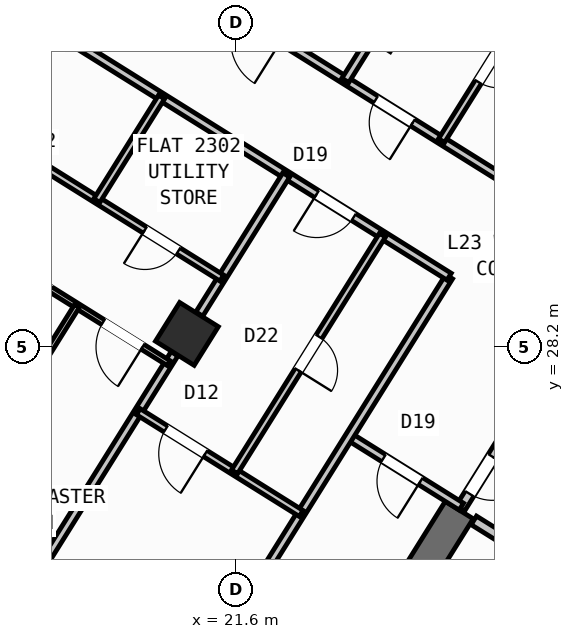
"""IFC4 building model, lengths in metres.
Left out: names, types, materials, properties, quantities, classifications, styles, units other than length and angle.
Written with IfcOpenShell. Run it as: python <this file> out.ifc"""

import sys

from ifc_helpers import new_model, si_unit, direction, frame, frame_2d, origin, origin_2d, place, context, subcontext, project, spatial, rectangle, hollow_rectangle, extrude, source, transform, mapped, element, fill, save


model = new_model("IFC4")
c1 = context("Model", 3, precision=1e-05, world=origin(), true_north=direction((0.0, 1.0)))
c2 = subcontext(c1, "Body", "Model", "MODEL_VIEW")
j1 = project(units=[si_unit("LENGTHUNIT", "METRE"), si_unit("PLANEANGLEUNIT", "RADIAN")], contexts=[c1])
p1 = place(None, origin())
s1 = spatial("IfcSite", under=j1, at=p1, CompositionType="ELEMENT")
p2 = place(p1, origin())
s2 = spatial("IfcBuilding", under=s1, at=p2, CompositionType="ELEMENT")
p3 = place(p2, frame((0.0, 0.0, 93.6)))
s3 = spatial("IfcBuildingStorey", under=s2, at=p3, CompositionType="ELEMENT", Elevation=93.6)
p4 = place(p3, frame((26.007, 24.976, 0.0), z_axis=(0.0, 0.0, 1.0), x_axis=(-0.529916319127, -0.848049936456, 0.0)))
e1 = element("IfcWall", 1, at=p4, inside=s3, PredefinedType="SHEAR", context=c2, shape_type="SweptSolid", body=[
    extrude(rectangle(XDim=6.375, YDim=0.65, at=frame_2d((3.188, 0.0))), origin(), (0.0, 0.0, 1.0), 3.35),
])
m1 = source(origin(), c2, "Body", "SweptSolid", [
    extrude(hollow_rectangle(XDim=0.9, YDim=0.9, WallThickness=0.036, at=origin_2d()), origin(), (0.0, 0.0, 1.0), 3.6),
])
p5 = place(p3, frame((20.632, 28.452, 0.0), z_axis=(0.0, 0.0, 1.0), x_axis=(-0.848048096156, 0.529919264233, 0.0)))
e2 = element("IfcColumn", 2, at=p5, inside=s3, PredefinedType="COLUMN", context=c2, shape_type="MappedRepresentation", body=[
    mapped(m1, transform((0.0, 0.0, 0.0), scale=1.0)),
])
p6 = place(p3, frame((31.76, 12.183, 0.0), z_axis=(0.0, 0.0, 1.0), x_axis=(-0.848047074256, 0.529920899612, 0.0)))
e3 = element("IfcWall", 3, at=p6, inside=s3, PredefinedType="STANDARD", context=c2, shape_type="SweptSolid", body=[
    extrude(rectangle(XDim=30.652, YDim=0.32, at=frame_2d((15.326, 0.0))), origin(), (0.0, 0.0, 1.0), 3.35),
])
p7 = place(p6, frame((15.153, 0.0, 0.0)))
e4 = element("IfcOpeningElement", 4, at=p7, cuts=e3, PredefinedType="OPENING", context=c2, shape_type="SweptSolid", body=[
    extrude(rectangle(XDim=1.2, YDim=2.15, at=frame_2d((0.6, 1.075))), frame((0.0, 0.17, 0.0), z_axis=(0.0, -1.0, 0.0), x_axis=(1.0, 0.0, 0.0)), (0.0, 0.0, 1.0), 0.34),
])
p8 = place(p6, frame((2.002, 0.0, 0.8)))
e5 = element("IfcOpeningElement", 5, at=p8, cuts=e3, PredefinedType="OPENING", context=c2, shape_type="SweptSolid", body=[
    extrude(rectangle(XDim=2.1, YDim=1.55, at=frame_2d((1.05, 0.775))), frame((0.0, 0.17, 0.0), z_axis=(0.0, -1.0, 0.0), x_axis=(1.0, 0.0, 0.0)), (0.0, 0.0, 1.0), 0.34),
])
p9 = place(p6, frame((7.206, 0.0, 0.8)))
e6 = element("IfcOpeningElement", 6, at=p9, cuts=e3, PredefinedType="OPENING", context=c2, shape_type="SweptSolid", body=[
    extrude(rectangle(XDim=2.1, YDim=1.55, at=frame_2d((1.05, 0.775))), frame((0.0, 0.17, 0.0), z_axis=(0.0, -1.0, 0.0), x_axis=(1.0, 0.0, 0.0)), (0.0, 0.0, 1.0), 0.34),
])
p10 = place(p6, frame((12.648, 0.0, 1.0)))
e7 = element("IfcOpeningElement", 7, at=p10, cuts=e3, PredefinedType="OPENING", context=c2, shape_type="SweptSolid", body=[
    extrude(rectangle(XDim=0.9, YDim=1.25, at=frame_2d((0.45, 0.625))), frame((0.0, 0.17, 0.0), z_axis=(0.0, -1.0, 0.0), x_axis=(1.0, 0.0, 0.0)), (0.0, 0.0, 1.0), 0.34),
])
p11 = place(p6, frame((27.974, 0.0, 0.95)))
e8 = element("IfcOpeningElement", 8, at=p11, cuts=e3, PredefinedType="OPENING", context=c2, shape_type="SweptSolid", body=[
    extrude(rectangle(XDim=1.2, YDim=1.4, at=frame_2d((0.6, 0.7))), frame((0.0, 0.17, 0.0), z_axis=(0.0, -1.0, 0.0), x_axis=(1.0, 0.0, 0.0)), (0.0, 0.0, 1.0), 0.34),
])
p12 = place(p6, frame((18.347, 0.0, 1.0)))
e9 = element("IfcOpeningElement", 9, at=p12, cuts=e3, PredefinedType="OPENING", context=c2, shape_type="SweptSolid", body=[
    extrude(rectangle(XDim=0.9, YDim=1.25, at=frame_2d((0.45, 0.625))), frame((0.0, 0.17, 0.0), z_axis=(0.0, -1.0, 0.0), x_axis=(1.0, 0.0, 0.0)), (0.0, 0.0, 1.0), 0.34),
])
p13 = place(p6, frame((20.931, 0.0, 1.0)))
e10 = element("IfcOpeningElement", 10, at=p13, cuts=e3, PredefinedType="OPENING", context=c2, shape_type="SweptSolid", body=[
    extrude(rectangle(XDim=0.65, YDim=1.15, at=frame_2d((0.325, 0.575))), frame((0.0, 0.17, 0.0), z_axis=(0.0, -1.0, 0.0), x_axis=(1.0, 0.0, 0.0)), (0.0, 0.0, 1.0), 0.34),
])
p14 = place(p6, frame((22.938, 0.0, 1.0)))
e11 = element("IfcOpeningElement", 11, at=p14, cuts=e3, PredefinedType="OPENING", context=c2, shape_type="SweptSolid", body=[
    extrude(rectangle(XDim=0.9, YDim=1.25, at=frame_2d((0.45, 0.625))), frame((0.0, 0.17, 0.0), z_axis=(0.0, -1.0, 0.0), x_axis=(1.0, 0.0, 0.0)), (0.0, 0.0, 1.0), 0.34),
])
p15 = place(p6, frame((25.069, 0.0, 1.0)))
e12 = element("IfcOpeningElement", 12, at=p15, cuts=e3, PredefinedType="OPENING", context=c2, shape_type="SweptSolid", body=[
    extrude(rectangle(XDim=0.9, YDim=1.25, at=frame_2d((0.45, 0.625))), frame((0.0, 0.17, 0.0), z_axis=(0.0, -1.0, 0.0), x_axis=(1.0, 0.0, 0.0)), (0.0, 0.0, 1.0), 0.34),
])
p16 = place(p3, frame((17.424, 47.083, 0.0), z_axis=(0.0, 0.0, 1.0), x_axis=(0.848049927979, -0.529916332693, 0.0)))
e13 = element("IfcWall", 13, at=p16, inside=s3, PredefinedType="STANDARD", context=c2, shape_type="SweptSolid", body=[
    extrude(rectangle(XDim=29.223, YDim=0.32, at=frame_2d((14.612, 0.0))), origin(), (0.0, 0.0, 1.0), 3.35),
])
p17 = place(p16, frame((3.745, 0.0, 0.0)))
e14 = element("IfcOpeningElement", 14, at=p17, cuts=e13, PredefinedType="OPENING", context=c2, shape_type="SweptSolid", body=[
    extrude(rectangle(XDim=1.05, YDim=2.15, at=frame_2d((0.525, 1.075))), frame((0.0, 0.17, 0.0), z_axis=(0.0, -1.0, 0.0), x_axis=(1.0, 0.0, 0.0)), (0.0, 0.0, 1.0), 0.34),
])
p18 = place(p16, frame((0.699, 0.0, 0.95)))
e15 = element("IfcOpeningElement", 15, at=p18, cuts=e13, PredefinedType="OPENING", context=c2, shape_type="SweptSolid", body=[
    extrude(rectangle(XDim=1.2, YDim=1.4, at=frame_2d((0.6, 0.7))), frame((0.0, 0.17, 0.0), z_axis=(0.0, -1.0, 0.0), x_axis=(1.0, 0.0, 0.0)), (0.0, 0.0, 1.0), 0.34),
])
p19 = place(p16, frame((6.951, 0.0, 1.0)))
e16 = element("IfcOpeningElement", 16, at=p19, cuts=e13, PredefinedType="OPENING", context=c2, shape_type="SweptSolid", body=[
    extrude(rectangle(XDim=0.9, YDim=1.25, at=frame_2d((0.45, 0.625))), frame((0.0, 0.17, 0.0), z_axis=(0.0, -1.0, 0.0), x_axis=(1.0, 0.0, 0.0)), (0.0, 0.0, 1.0), 0.34),
])
p20 = place(p16, frame((9.841, 0.0, 0.85)))
e17 = element("IfcOpeningElement", 17, at=p20, cuts=e13, PredefinedType="OPENING", context=c2, shape_type="SweptSolid", body=[
    extrude(rectangle(XDim=1.5, YDim=1.5, at=frame_2d((0.75, 0.75))), frame((0.0, 0.17, 0.0), z_axis=(0.0, -1.0, 0.0), x_axis=(1.0, 0.0, 0.0)), (0.0, 0.0, 1.0), 0.34),
])
p21 = place(p16, frame((13.889, 0.0, 0.95)))
e18 = element("IfcOpeningElement", 18, at=p21, cuts=e13, PredefinedType="OPENING", context=c2, shape_type="SweptSolid", body=[
    extrude(rectangle(XDim=1.2, YDim=1.4, at=frame_2d((0.6, 0.7))), frame((0.0, 0.17, 0.0), z_axis=(0.0, -1.0, 0.0), x_axis=(1.0, 0.0, 0.0)), (0.0, 0.0, 1.0), 0.34),
])
p22 = place(p16, frame((17.254, 0.0, 1.0)))
e19 = element("IfcOpeningElement", 19, at=p22, cuts=e13, PredefinedType="OPENING", context=c2, shape_type="SweptSolid", body=[
    extrude(rectangle(XDim=0.9, YDim=1.25, at=frame_2d((0.45, 0.625))), frame((0.0, 0.17, 0.0), z_axis=(0.0, -1.0, 0.0), x_axis=(1.0, 0.0, 0.0)), (0.0, 0.0, 1.0), 0.34),
])
p23 = place(p16, frame((20.764, 0.0, 0.8)))
e20 = element("IfcOpeningElement", 20, at=p23, cuts=e13, PredefinedType="OPENING", context=c2, shape_type="SweptSolid", body=[
    extrude(rectangle(XDim=2.1, YDim=1.55, at=frame_2d((1.05, 0.775))), frame((0.0, 0.17, 0.0), z_axis=(0.0, -1.0, 0.0), x_axis=(1.0, 0.0, 0.0)), (0.0, 0.0, 1.0), 0.34),
])
p24 = place(p16, frame((25.403, 0.0, 0.8)))
e21 = element("IfcOpeningElement", 21, at=p24, cuts=e13, PredefinedType="OPENING", context=c2, shape_type="SweptSolid", body=[
    extrude(rectangle(XDim=2.1, YDim=1.55, at=frame_2d((1.05, 0.775))), frame((0.0, 0.17, 0.0), z_axis=(0.0, -1.0, 0.0), x_axis=(1.0, 0.0, 0.0)), (0.0, 0.0, 1.0), 0.34),
])
p25 = place(p3, frame((31.525, 21.504, 0.0), z_axis=(0.0, 0.0, 1.0), x_axis=(-0.848044998614, 0.529924221305, 0.0)))
e22 = element("IfcWall", 22, at=p25, inside=s3, PredefinedType="STANDARD", context=c2, shape_type="SweptSolid", body=[
    extrude(rectangle(XDim=6.168, YDim=0.2, at=frame_2d((3.084, 0.0))), origin(), (0.0, 0.0, 1.0), 3.34),
])
p26 = place(p25, frame((4.4, 0.0, 0.0)))
e23 = element("IfcOpeningElement", 23, at=p26, cuts=e22, PredefinedType="OPENING", context=c2, shape_type="SweptSolid", body=[
    extrude(rectangle(XDim=0.86, YDim=2.05, at=frame_2d((0.43, 1.025))), frame((0.0, 0.11, 0.0), z_axis=(0.0, -1.0, 0.0), x_axis=(1.0, 0.0, 0.0)), (0.0, 0.0, 1.0), 0.22),
])
p27 = place(p25, frame((0.35, 0.0, 0.0)))
e24 = element("IfcOpeningElement", 24, at=p27, cuts=e22, PredefinedType="OPENING", context=c2, shape_type="SweptSolid", body=[
    extrude(rectangle(XDim=0.86, YDim=2.05, at=frame_2d((0.43, 1.025))), frame((0.0, 0.11, 0.0), z_axis=(0.0, -1.0, 0.0), x_axis=(1.0, 0.0, 0.0)), (0.0, 0.0, 1.0), 0.22),
])
p28 = place(p3, frame((27.596, 27.52, 0.0), z_axis=(0.0, 0.0, 1.0), x_axis=(-0.529865479138, -0.848081702443, 0.0)))
e25 = element("IfcWall", 25, at=p28, inside=s3, PredefinedType="STANDARD", context=c2, shape_type="SweptSolid", body=[
    extrude(rectangle(XDim=2.96, YDim=0.2, at=frame_2d((1.48, 0.0))), origin(), (0.0, 0.0, 1.0), 3.34),
])
p29 = place(p28, frame((1.76, 0.0, 0.0)))
e26 = element("IfcOpeningElement", 26, at=p29, cuts=e25, PredefinedType="OPENING", context=c2, shape_type="SweptSolid", body=[
    extrude(rectangle(XDim=0.86, YDim=2.05, at=frame_2d((0.43, 1.025))), frame((0.0, 0.11, 0.0), z_axis=(0.0, -1.0, 0.0), x_axis=(1.0, 0.0, 0.0)), (0.0, 0.0, 1.0), 0.22),
])
p30 = place(p3, frame((26.049, 25.044, 0.0), z_axis=(0.0, 0.0, 1.0), x_axis=(-0.848050851465, 0.529914854792, 0.0)))
e27 = element("IfcWall", 27, at=p30, inside=s3, PredefinedType="PARTITIONING", context=c2, shape_type="SweptSolid", body=[
    extrude(rectangle(XDim=2.61, YDim=0.16, at=frame_2d((1.305, 0.0))), origin(), (0.0, 0.0, 1.0), 2.775),
])
p31 = place(p30, frame((0.95, 0.0, 0.0)))
e28 = element("IfcOpeningElement", 28, at=p31, cuts=e27, PredefinedType="OPENING", context=c2, shape_type="SweptSolid", body=[
    extrude(rectangle(XDim=0.86, YDim=2.05, at=frame_2d((0.43, 1.025))), frame((0.0, 0.09, 0.0), z_axis=(0.0, -1.0, 0.0), x_axis=(1.0, 0.0, 0.0)), (0.0, 0.0, 1.0), 0.18),
])
p32 = place(p3, frame((25.807, 29.582, 0.0), z_axis=(0.0, 0.0, 1.0), x_axis=(-0.529920357077, -0.848047413271, 0.0)))
e29 = element("IfcWall", 29, at=p32, inside=s3, PredefinedType="PARTITIONING", context=c2, shape_type="SweptSolid", body=[
    extrude(rectangle(XDim=11.45, YDim=0.16, at=frame_2d((5.725, 0.0))), origin(), (0.0, 0.0, 1.0), 3.34),
])
p33 = place(p3, frame((26.973, 31.447, 0.0), z_axis=(0.0, 0.0, 1.0), x_axis=(-0.848048310262, 0.529918921593, 0.0)))
e30 = element("IfcWall", 30, at=p33, inside=s3, PredefinedType="PARTITIONING", context=c2, shape_type="SweptSolid", body=[
    extrude(rectangle(XDim=16.73, YDim=0.16, at=frame_2d((8.365, 0.0))), origin(), (0.0, 0.0, 1.0), 3.34),
])
p34 = place(p33, frame((2.22, 0.0, 0.0)))
e31 = element("IfcOpeningElement", 31, at=p34, cuts=e30, PredefinedType="OPENING", context=c2, shape_type="SweptSolid", body=[
    extrude(rectangle(XDim=0.86, YDim=2.05, at=frame_2d((0.43, 1.025))), frame((0.0, 0.09, 0.0), z_axis=(0.0, -1.0, 0.0), x_axis=(1.0, 0.0, 0.0)), (0.0, 0.0, 1.0), 0.18),
])
p35 = place(p33, frame((5.28, 0.0, 0.0)))
e32 = element("IfcOpeningElement", 32, at=p35, cuts=e30, PredefinedType="OPENING", context=c2, shape_type="SweptSolid", body=[
    extrude(rectangle(XDim=1.0, YDim=2.1, at=frame_2d((0.5, 1.05))), frame((0.0, 0.09, 0.0), z_axis=(0.0, -1.0, 0.0), x_axis=(1.0, 0.0, 0.0)), (0.0, 0.0, 1.0), 0.18),
])
p36 = place(p3, frame((25.807, 29.582, 0.0), z_axis=(0.0, 0.0, 1.0), x_axis=(-0.848052408131, 0.529912363569, 0.0)))
e33 = element("IfcWall", 33, at=p36, inside=s3, PredefinedType="PARTITIONING", context=c2, shape_type="SweptSolid", body=[
    extrude(rectangle(XDim=16.73, YDim=0.16, at=frame_2d((8.365, 0.0))), origin(), (0.0, 0.0, 1.0), 3.34),
])
p37 = place(p36, frame((2.22, 0.0, 0.0)))
e34 = element("IfcOpeningElement", 34, at=p37, cuts=e33, PredefinedType="OPENING", context=c2, shape_type="SweptSolid", body=[
    extrude(rectangle(XDim=0.86, YDim=2.05, at=frame_2d((0.43, 1.025))), frame((0.0, 0.09, 0.0), z_axis=(0.0, -1.0, 0.0), x_axis=(1.0, 0.0, 0.0)), (0.0, 0.0, 1.0), 0.18),
])
p38 = place(p36, frame((14.013, 0.0, 0.0)))
e35 = element("IfcOpeningElement", 35, at=p38, cuts=e33, PredefinedType="OPENING", context=c2, shape_type="SweptSolid", body=[
    extrude(rectangle(XDim=1.0, YDim=2.1, at=frame_2d((0.5, 1.05))), frame((0.0, 0.09, 0.0), z_axis=(0.0, -1.0, 0.0), x_axis=(1.0, 0.0, 0.0)), (0.0, 0.0, 1.0), 0.18),
])
p39 = place(p3, frame((22.593, 31.59, 0.0), z_axis=(0.0, 0.0, 1.0), x_axis=(-0.529924383291, -0.848044897393, 0.0)))
e36 = element("IfcWall", 36, at=p39, inside=s3, PredefinedType="PARTITIONING", context=c2, shape_type="SweptSolid", body=[
    extrude(rectangle(XDim=3.238, YDim=0.16, at=frame_2d((1.619, 0.0))), origin(), (0.0, 0.0, 1.0), 2.775),
])
p40 = place(p3, frame((20.387, 28.06, 0.0), z_axis=(0.0, 0.0, 1.0), x_axis=(-0.529902564924, -0.848058530814, 0.0)))
e37 = element("IfcWall", 37, at=p40, inside=s3, PredefinedType="PARTITIONING", context=c2, shape_type="SweptSolid", body=[
    extrude(rectangle(XDim=6.376, YDim=0.16, at=frame_2d((3.188, 0.0))), origin(), (0.0, 0.0, 1.0), 2.775),
])
p41 = place(p3, frame((22.887, 24.909, 0.0), z_axis=(0.0, 0.0, 1.0), x_axis=(-0.84803087207, 0.529946827537, 0.0)))
e38 = element("IfcWall", 38, at=p41, inside=s3, PredefinedType="PLUMBINGWALL", context=c2, shape_type="SweptSolid", body=[
    extrude(rectangle(XDim=3.79, YDim=0.14, at=frame_2d((1.895, 0.0))), origin(), (0.0, 0.0, 1.0), 3.34),
])
p42 = place(p41, frame((2.23, 0.0, 0.0)))
e39 = element("IfcOpeningElement", 39, at=p42, cuts=e38, PredefinedType="OPENING", context=c2, shape_type="SweptSolid", body=[
    extrude(rectangle(XDim=0.92, YDim=2.08, at=frame_2d((0.46, 1.04))), frame((0.0, 0.08, 0.0), z_axis=(0.0, -1.0, 0.0), x_axis=(1.0, 0.0, 0.0)), (0.0, 0.0, 1.0), 0.16),
])
p43 = place(p3, frame((24.492, 30.403, 0.0), z_axis=(0.0, 0.0, 1.0), x_axis=(-0.529919283494, -0.848048084121, 0.0)))
e40 = element("IfcWall", 40, at=p43, inside=s3, PredefinedType="PLUMBINGWALL", context=c2, shape_type="SweptSolid", body=[
    extrude(rectangle(XDim=5.51, YDim=0.14, at=frame_2d((2.755, 0.0))), origin(), (0.0, 0.0, 1.0), 2.995),
])
p44 = place(p43, frame((2.365, 0.0, 0.0)))
e41 = element("IfcOpeningElement", 41, at=p44, cuts=e40, PredefinedType="OPENING", context=c2, shape_type="SweptSolid", body=[
    extrude(rectangle(XDim=0.78, YDim=2.05, at=frame_2d((0.39, 1.025))), frame((0.0, 0.08, 0.0), z_axis=(0.0, -1.0, 0.0), x_axis=(1.0, 0.0, 0.0)), (0.0, 0.0, 1.0), 0.16),
])
p45 = place(p3, frame((21.321, 29.554, 0.0), z_axis=(0.0, 0.0, 1.0), x_axis=(-0.84803529765, 0.529939745575, 0.0)))
e42 = element("IfcWall", 42, at=p45, inside=s3, PredefinedType="PLUMBINGWALL", context=c2, shape_type="SweptSolid", body=[
    extrude(rectangle(XDim=8.527, YDim=0.14, at=frame_2d((4.264, 0.0))), origin(), (0.0, 0.0, 1.0), 3.34),
])
p46 = place(p45, frame((5.155, 0.0, 0.0)))
e43 = element("IfcOpeningElement", 43, at=p46, cuts=e42, PredefinedType="OPENING", context=c2, shape_type="SweptSolid", body=[
    extrude(rectangle(XDim=0.78, YDim=2.05, at=frame_2d((0.39, 1.025))), frame((0.0, 0.08, 0.0), z_axis=(0.0, -1.0, 0.0), x_axis=(1.0, 0.0, 0.0)), (0.0, 0.0, 1.0), 0.16),
])
p47 = place(p45, frame((1.011, 0.0, 0.0)))
e44 = element("IfcOpeningElement", 44, at=p47, cuts=e42, PredefinedType="OPENING", context=c2, shape_type="SweptSolid", body=[
    extrude(rectangle(XDim=0.78, YDim=2.05, at=frame_2d((0.39, 1.025))), frame((0.0, 0.08, 0.0), z_axis=(0.0, -1.0, 0.0), x_axis=(1.0, 0.0, 0.0)), (0.0, 0.0, 1.0), 0.16),
])
p48 = place(p3, frame((20.132, 33.128, 0.0), z_axis=(0.0, 0.0, 1.0), x_axis=(-0.529935194983, -0.848038141311, 0.0)))
e45 = element("IfcWall", 45, at=p48, inside=s3, PredefinedType="PLUMBINGWALL", context=c2, shape_type="SweptSolid", body=[
    extrude(rectangle(XDim=2.41, YDim=0.14, at=frame_2d((1.205, 0.0))), origin(), (0.0, 0.0, 1.0), 3.34),
])
p49 = place(p3, frame((20.272, 27.875, 0.0), z_axis=(0.0, 0.0, 1.0), x_axis=(-0.848056204746, 0.529906287557, 0.0)))
e46 = element("IfcWall", 46, at=p49, inside=s3, PredefinedType="PARTITIONING", context=c2, shape_type="SweptSolid", body=[
    extrude(rectangle(XDim=8.527, YDim=0.11, at=frame_2d((4.264, 0.0))), origin(), (0.0, 0.0, 1.0), 3.34),
])
p50 = place(p49, frame((0.606, 0.0, 0.0)))
e47 = element("IfcOpeningElement", 47, at=p50, cuts=e46, PredefinedType="OPENING", context=c2, shape_type="SweptSolid", body=[
    extrude(rectangle(XDim=0.92, YDim=2.08, at=frame_2d((0.46, 1.04))), frame((0.0, 0.065, 0.0), z_axis=(0.0, -1.0, 0.0), x_axis=(1.0, 0.0, 0.0)), (0.0, 0.0, 1.0), 0.13),
])
p51 = place(p49, frame((2.738, 0.0, 0.0)))
e48 = element("IfcOpeningElement", 48, at=p51, cuts=e46, PredefinedType="OPENING", context=c2, shape_type="SweptSolid", body=[
    extrude(rectangle(XDim=0.92, YDim=2.08, at=frame_2d((0.46, 1.04))), frame((0.0, 0.065, 0.0), z_axis=(0.0, -1.0, 0.0), x_axis=(1.0, 0.0, 0.0)), (0.0, 0.0, 1.0), 0.13),
])
p52 = place(p49, frame((4.869, 0.0, 0.0)))
e49 = element("IfcOpeningElement", 49, at=p52, cuts=e46, PredefinedType="OPENING", context=c2, shape_type="SweptSolid", body=[
    extrude(rectangle(XDim=0.92, YDim=2.08, at=frame_2d((0.46, 1.04))), frame((0.0, 0.065, 0.0), z_axis=(0.0, -1.0, 0.0), x_axis=(1.0, 0.0, 0.0)), (0.0, 0.0, 1.0), 0.13),
])
p53 = place(p49, frame((7.001, 0.0, 0.0)))
e50 = element("IfcOpeningElement", 50, at=p53, cuts=e46, PredefinedType="OPENING", context=c2, shape_type="SweptSolid", body=[
    extrude(rectangle(XDim=0.92, YDim=2.08, at=frame_2d((0.46, 1.04))), frame((0.0, 0.065, 0.0), z_axis=(0.0, -1.0, 0.0), x_axis=(1.0, 0.0, 0.0)), (0.0, 0.0, 1.0), 0.13),
])
p54 = place(p3, frame((18.464, 29.005, 0.0), z_axis=(0.0, 0.0, 1.0), x_axis=(-0.529927182287, -0.848043148356, 0.0)))
e51 = element("IfcWall", 51, at=p54, inside=s3, PredefinedType="PARTITIONING", context=c2, shape_type="SweptSolid", body=[
    extrude(rectangle(XDim=7.34, YDim=0.11, at=frame_2d((3.67, 0.0))), origin(), (0.0, 0.0, 1.0), 2.995),
])
p55 = place(p3, frame((24.256, 34.251, 0.0), z_axis=(0.0, 0.0, 1.0), x_axis=(-0.529952145338, -0.848027548876, 0.0)))
e52 = element("IfcWall", 52, at=p55, inside=s3, PredefinedType="PARTITIONING", context=c2, shape_type="SweptSolid", body=[
    extrude(rectangle(XDim=0.938, YDim=0.16, at=frame_2d((0.469, 0.0))), origin(), (0.0, 0.0, 1.0), 2.775),
])
p56 = place(p3, frame((27.518, 35.245, 0.0), z_axis=(0.0, 0.0, 1.0), x_axis=(-0.529948921118, -0.848029563757, 0.0)))
e53 = element("IfcWall", 53, at=p56, inside=s3, PredefinedType="PLUMBINGWALL", context=c2, shape_type="SweptSolid", body=[
    extrude(rectangle(XDim=3.51, YDim=0.14, at=frame_2d((1.755, 0.0))), origin(), (0.0, 0.0, 1.0), 2.995),
])
p57 = place(p56, frame((1.365, 0.0, 0.0)))
e54 = element("IfcOpeningElement", 54, at=p57, cuts=e53, PredefinedType="OPENING", context=c2, shape_type="SweptSolid", body=[
    extrude(rectangle(XDim=0.78, YDim=2.05, at=frame_2d((0.39, 1.025))), frame((0.0, 0.08, 0.0), z_axis=(0.0, -1.0, 0.0), x_axis=(1.0, 0.0, 0.0)), (0.0, 0.0, 1.0), 0.16),
])
m2 = source(origin(), c2, "Body", "SweptSolid", [
    extrude(rectangle(XDim=0.86, YDim=2.05, at=frame_2d((0.43, 1.025))), frame((0.0, 0.025, 0.0), z_axis=(0.0, -1.0, 0.0), x_axis=(1.0, 0.0, 0.0)), (0.0, 0.0, 1.0), 0.05),
])
p58 = place(p31, origin())
e55 = element("IfcDoor", 55, at=p58, inside=s3, OperationType="SINGLE_SWING_LEFT", PredefinedType="DOOR", context=c2, shape_type="MappedRepresentation", body=[
    mapped(m2, transform((0.0, 0.0, 0.0), scale=1.0)),
])
fill(e28, e55)
p59 = place(p29, origin())
e56 = element("IfcDoor", 56, at=p59, inside=s3, OperationType="SINGLE_SWING_LEFT", PredefinedType="DOOR", context=c2, shape_type="MappedRepresentation", body=[
    mapped(m2, transform((0.0, 0.0, 0.0), scale=1.0)),
])
fill(e26, e56)
p60 = place(p37, origin())
e57 = element("IfcDoor", 57, at=p60, inside=s3, OperationType="SINGLE_SWING_RIGHT", PredefinedType="DOOR", context=c2, shape_type="MappedRepresentation", body=[
    mapped(m2, transform((0.0, 0.0, 0.0), scale=1.0)),
])
fill(e34, e57)
m3 = source(origin(), c2, "Body", "SweptSolid", [
    extrude(rectangle(XDim=0.92, YDim=2.08, at=frame_2d((0.46, 1.04))), frame((0.0, 0.025, 0.0), z_axis=(0.0, -1.0, 0.0), x_axis=(1.0, 0.0, 0.0)), (0.0, 0.0, 1.0), 0.05),
])
p61 = place(p42, origin())
e58 = element("IfcDoor", 58, at=p61, inside=s3, OperationType="SINGLE_SWING_LEFT", PredefinedType="DOOR", context=c2, shape_type="MappedRepresentation", body=[
    mapped(m3, transform((0.0, 0.0, 0.0), scale=1.0)),
])
fill(e39, e58)
m4 = source(origin(), c2, "Body", "SweptSolid", [
    extrude(rectangle(XDim=0.78, YDim=2.05, at=frame_2d((0.39, 1.025))), frame((0.0, 0.025, 0.0), z_axis=(0.0, -1.0, 0.0), x_axis=(1.0, 0.0, 0.0)), (0.0, 0.0, 1.0), 0.05),
])
p62 = place(p44, origin())
e59 = element("IfcDoor", 59, at=p62, inside=s3, OperationType="SINGLE_SWING_RIGHT", PredefinedType="DOOR", context=c2, shape_type="MappedRepresentation", body=[
    mapped(m4, transform((0.0, 0.0, 0.0), scale=1.0)),
])
fill(e41, e59)
p63 = place(p47, origin())
e60 = element("IfcDoor", 60, at=p63, inside=s3, OperationType="SINGLE_SWING_RIGHT", PredefinedType="DOOR", context=c2, shape_type="MappedRepresentation", body=[
    mapped(m4, transform((0.0, 0.0, 0.0), scale=1.0)),
])
fill(e44, e60)
p64 = place(p50, origin())
e61 = element("IfcDoor", 61, at=p64, inside=s3, OperationType="SINGLE_SWING_LEFT", PredefinedType="DOOR", context=c2, shape_type="MappedRepresentation", body=[
    mapped(m3, transform((0.0, 0.0, 0.0), scale=1.0)),
])
fill(e47, e61)
p65 = place(p34, origin())
e62 = element("IfcDoor", 62, at=p65, inside=s3, OperationType="SINGLE_SWING_LEFT", PredefinedType="DOOR", context=c2, shape_type="MappedRepresentation", body=[
    mapped(m2, transform((0.0, 0.0, 0.0), scale=1.0)),
])
fill(e31, e62)
p66 = place(p57, origin())
e63 = element("IfcDoor", 63, at=p66, inside=s3, OperationType="SINGLE_SWING_LEFT", PredefinedType="DOOR", context=c2, shape_type="MappedRepresentation", body=[
    mapped(m4, transform((0.0, 0.0, 0.0), scale=1.0)),
])
fill(e54, e63)
save(model, sys.argv[1])
